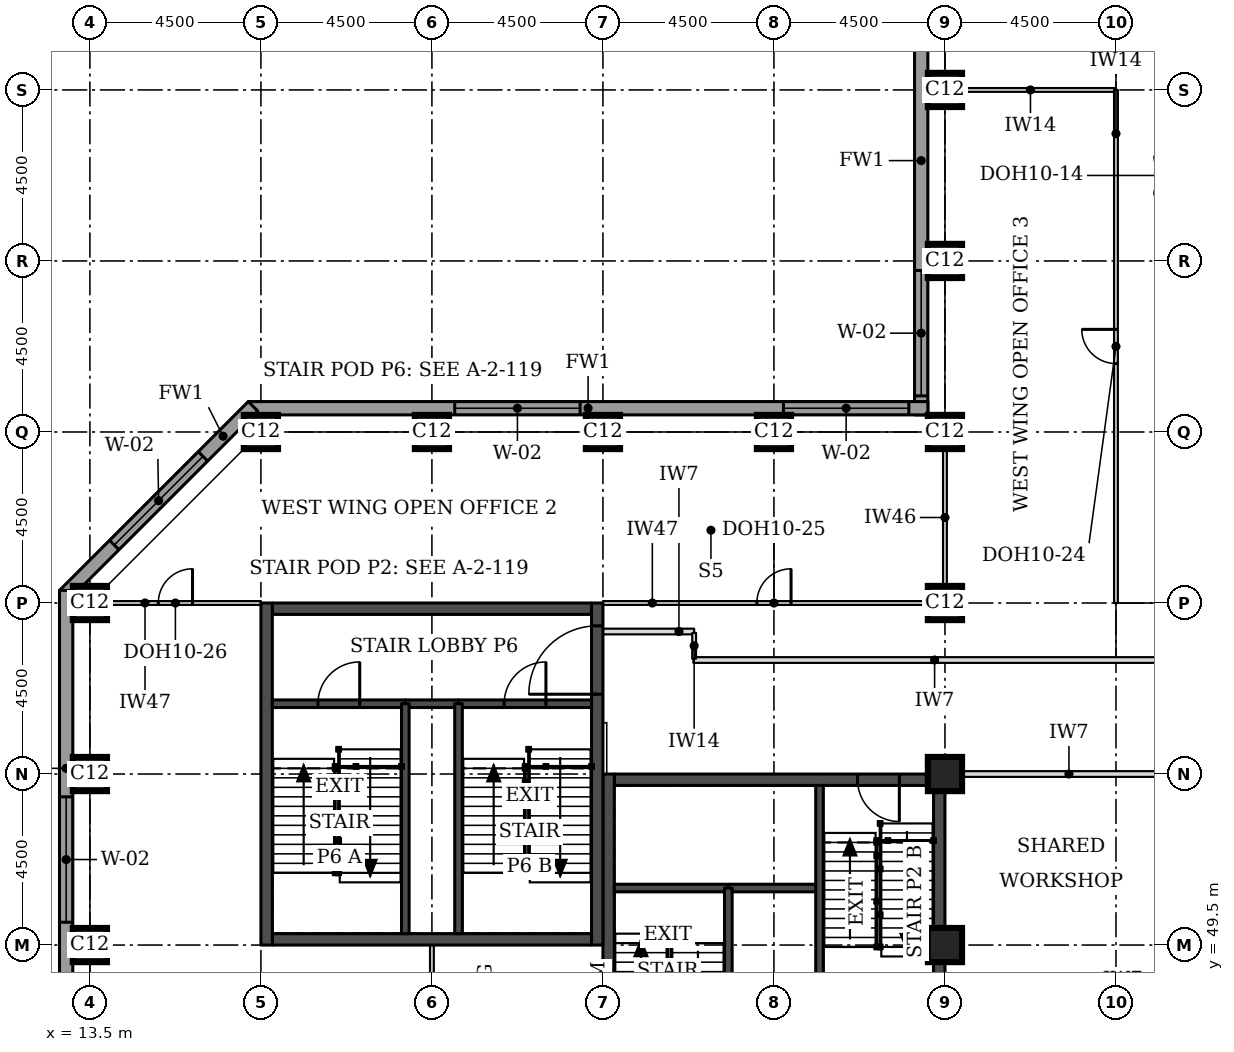
"""IFC4 building model, lengths in metres.
Left out: names, types, materials, properties, quantities, classifications, styles, units other than length and angle.
Written with IfcOpenShell. Run it as: python <this file> out.ifc"""

import sys

from ifc_helpers import new_model, si_unit, direction, frame, frame_2d, origin, origin_2d, place, context, subcontext, project, spatial, rectangle, extrude, element, fill, save


model = new_model("IFC4")
c1 = context("Model", 3, precision=1e-05, world=origin(), true_north=direction((0.0, 1.0)))
c2 = subcontext(c1, "Body", "Model", "MODEL_VIEW")
j1 = project(units=[si_unit("LENGTHUNIT", "METRE"), si_unit("PLANEANGLEUNIT", "RADIAN")], contexts=[c1])
p1 = place(None, origin())
s1 = spatial("IfcSite", under=j1, at=p1, CompositionType="ELEMENT")
p2 = place(p1, origin())
s2 = spatial("IfcBuilding", under=s1, at=p2, CompositionType="ELEMENT")
p3 = place(p2, frame((0.0, 0.0, 223.0)))
s3 = spatial("IfcBuildingStorey", under=s2, at=p3, CompositionType="ELEMENT", Elevation=223.0)
for number, where, z_axis, x_axis in (
    (1, (13.5, 49.5, 0.0), (0.0, 0.0, 1.0), (1.0, 0.0, 0.0)),
    (2, (36.0, 49.5, 0.0), (0.0, 0.0, 1.0), (1.0, 0.0, 0.0)),
    (3, (13.5, 54.0, 0.0), (0.0, 0.0, 1.0), (1.0, 0.0, 0.0)),
    (4, (36.0, 54.0, 0.0), (0.0, 0.0, 1.0), (1.0, 0.0, 0.0)),
    (5, (13.5, 58.5, 0.0), (0.0, 0.0, 1.0), (1.0, 0.0, 0.0)),
    (6, (36.0, 58.5, 0.0), (0.0, 0.0, 1.0), (1.0, 0.0, 0.0)),
    (7, (18.0, 63.0, 0.0), (0.0, 0.0, 1.0), (1.0, 0.0, 0.0)),
    (8, (22.5, 63.0, 0.0), (0.0, 0.0, 1.0), (1.0, 0.0, 0.0)),
    (9, (27.0, 63.0, 0.0), (0.0, 0.0, 1.0), (1.0, 0.0, 0.0)),
    (10, (31.5, 63.0, 0.0), (0.0, 0.0, 1.0), (1.0, 0.0, 0.0)),
    (11, (36.0, 63.0, 0.0), (0.0, 0.0, 1.0), (1.0, 0.0, 0.0)),
    (12, (36.0, 67.5, 0.0), (0.0, 0.0, 1.0), (1.0, 0.0, 0.0)),
    (13, (36.0, 72.0, 0.0), (0.0, 0.0, 1.0), (1.0, 0.0, 0.0)),
):
    element("IfcColumn", number, at=place(p3, frame(where, z_axis=z_axis, x_axis=x_axis)), inside=s3, PredefinedType="COLUMN", context=c2, shape_type="SweptSolid", body=[
        extrude(rectangle(XDim=0.9, YDim=0.9, at=origin_2d()), origin(), (0.0, 0.0, 1.0), 3.7),
    ])
p4 = place(p3, frame((27.3, 53.85, 0.0), z_axis=(0.0, 0.0, 1.0), x_axis=(1.0, 0.0, 0.0)))
e14 = element("IfcWall", 14, at=p4, inside=s3, PredefinedType="SHEAR", context=c2, shape_type="SweptSolid", body=[
    extrude(rectangle(XDim=8.4, YDim=0.3, at=frame_2d((4.2, 0.0))), origin(), (0.0, 0.0, 1.0), 3.7),
])
p5 = place(p4, frame((6.4, 0.0, 0.0)))
e15 = element("IfcOpeningElement", 15, at=p5, cuts=e14, PredefinedType="OPENING", context=c2, shape_type="SweptSolid", body=[
    extrude(rectangle(XDim=1.1, YDim=2.1, at=frame_2d((0.55, 1.05))), frame((0.0, 0.16, 0.0), z_axis=(0.0, -1.0, 0.0), x_axis=(1.0, 0.0, 0.0)), (0.0, 0.0, 1.0), 0.32),
])
p6 = place(p3, frame((27.15, 45.0, 0.0), z_axis=(0.0, 0.0, 1.0), x_axis=(0.0, 1.0, 0.0)))
e16 = element("IfcWall", 16, at=p6, inside=s3, PredefinedType="SHEAR", context=c2, shape_type="SweptSolid", body=[
    extrude(rectangle(XDim=9.0, YDim=0.3, at=frame_2d((4.5, 0.0))), origin(), (0.0, 0.0, 1.0), 3.7),
])
p7 = place(p6, frame((0.4, 0.0, 0.0)))
e17 = element("IfcOpeningElement", 17, at=p7, cuts=e16, PredefinedType="OPENING", context=c2, shape_type="SweptSolid", body=[
    extrude(rectangle(XDim=1.1, YDim=2.1, at=frame_2d((0.55, 1.05))), frame((0.0, 0.16, 0.0), z_axis=(0.0, -1.0, 0.0), x_axis=(1.0, 0.0, 0.0)), (0.0, 0.0, 1.0), 0.32),
])
p8 = place(p3, frame((35.85, 45.0, 0.0), z_axis=(0.0, 0.0, 1.0), x_axis=(0.0, 1.0, 0.0)))
e18 = element("IfcWall", 18, at=p8, inside=s3, PredefinedType="SHEAR", context=c2, shape_type="SweptSolid", body=[
    extrude(rectangle(XDim=9.0, YDim=0.3, at=frame_2d((4.5, 0.0))), origin(), (0.0, 0.0, 1.0), 3.7),
])
for number, where, z_axis, x_axis in (
    (19, (18.3, 49.65, 0.0), (0.0, 0.0, 1.0), (1.0, 0.0, 0.0)),
    (20, (18.3, 58.35, 0.0), (0.0, 0.0, 1.0), (1.0, 0.0, 0.0)),
):
    element("IfcWall", number, at=place(p3, frame(where, z_axis=z_axis, x_axis=x_axis)), inside=s3, PredefinedType="SHEAR", context=c2, shape_type="SweptSolid", body=[
        extrude(rectangle(XDim=8.4, YDim=0.3, at=frame_2d((4.2, 0.0))), origin(), (0.0, 0.0, 1.0), 3.7),
    ])
p9 = place(p3, frame((18.15, 49.5, 0.0), z_axis=(0.0, 0.0, 1.0), x_axis=(0.0, 1.0, 0.0)))
e21 = element("IfcWall", 21, at=p9, inside=s3, PredefinedType="SHEAR", context=c2, shape_type="SweptSolid", body=[
    extrude(rectangle(XDim=9.0, YDim=0.3, at=frame_2d((4.5, 0.0))), origin(), (0.0, 0.0, 1.0), 3.7),
])
p10 = place(p3, frame((26.85, 49.5, 0.0), z_axis=(0.0, 0.0, 1.0), x_axis=(0.0, 1.0, 0.0)))
e22 = element("IfcWall", 22, at=p10, inside=s3, PredefinedType="SHEAR", context=c2, shape_type="SweptSolid", body=[
    extrude(rectangle(XDim=9.0, YDim=0.3, at=frame_2d((4.5, 0.0))), origin(), (0.0, 0.0, 1.0), 3.7),
])
p11 = place(p10, frame((6.6, 0.0, 0.0)))
e23 = element("IfcOpeningElement", 23, at=p11, cuts=e22, PredefinedType="OPENING", context=c2, shape_type="SweptSolid", body=[
    extrude(rectangle(XDim=1.8, YDim=2.1, at=frame_2d((0.9, 1.05))), frame((0.0, 0.16, 0.0), z_axis=(0.0, -1.0, 0.0), x_axis=(1.0, 0.0, 0.0)), (0.0, 0.0, 1.0), 0.32),
])
p12 = place(p3, frame((35.375, 76.831, 0.0), z_axis=(0.0, 0.0, 1.0), x_axis=(0.0, -1.0, 0.0)))
e24 = element("IfcWall", 24, at=p12, inside=s3, PredefinedType="STANDARD", context=c2, shape_type="SweptSolid", body=[
    extrude(rectangle(XDim=13.381, YDim=0.35, at=frame_2d((6.691, 0.0))), origin(), (0.0, 0.0, 1.0), 3.525),
])
p13 = place(p12, frame((9.581, 0.0, 0.9)))
e25 = element("IfcOpeningElement", 25, at=p13, cuts=e24, PredefinedType="OPENING", context=c2, shape_type="SweptSolid", body=[
    extrude(rectangle(XDim=3.3, YDim=1.9, at=frame_2d((1.65, 0.95))), frame((0.0, 0.185, 0.0), z_axis=(0.0, -1.0, 0.0), x_axis=(1.0, 0.0, 0.0)), (0.0, 0.0, 1.0), 0.37),
])
p14 = place(p3, frame((35.55, 63.625, 0.0), z_axis=(0.0, 0.0, 1.0), x_axis=(-1.0, 0.0, 0.0)))
e26 = element("IfcWall", 26, at=p14, inside=s3, PredefinedType="STANDARD", context=c2, shape_type="SweptSolid", body=[
    extrude(rectangle(XDim=17.881, YDim=0.35, at=frame_2d((8.941, 0.0))), origin(), (0.0, 0.0, 1.0), 3.525),
])
p15 = place(p14, frame((0.5, 0.0, 0.9)))
e27 = element("IfcOpeningElement", 27, at=p15, cuts=e26, PredefinedType="OPENING", context=c2, shape_type="SweptSolid", body=[
    extrude(rectangle(XDim=3.3, YDim=1.9, at=frame_2d((1.65, 0.95))), frame((0.0, 0.185, 0.0), z_axis=(0.0, -1.0, 0.0), x_axis=(1.0, 0.0, 0.0)), (0.0, 0.0, 1.0), 0.37),
])
p16 = place(p14, frame((9.15, 0.0, 0.9)))
e28 = element("IfcOpeningElement", 28, at=p16, cuts=e26, PredefinedType="OPENING", context=c2, shape_type="SweptSolid", body=[
    extrude(rectangle(XDim=3.3, YDim=1.9, at=frame_2d((1.65, 0.95))), frame((0.0, 0.185, 0.0), z_axis=(0.0, -1.0, 0.0), x_axis=(1.0, 0.0, 0.0)), (0.0, 0.0, 1.0), 0.37),
])
p17 = place(p3, frame((17.792, 63.676, 0.0), z_axis=(0.0, 0.0, 1.0), x_axis=(-0.707106781187, -0.707106781187, 0.0)))
e29 = element("IfcWall", 29, at=p17, inside=s3, PredefinedType="STANDARD", context=c2, shape_type="SweptSolid", body=[
    extrude(rectangle(XDim=7.027, YDim=0.35, at=frame_2d((3.513, 0.0))), origin(), (0.0, 0.0, 1.0), 3.525),
])
p18 = place(p17, frame((1.863, 0.0, 0.9)))
e30 = element("IfcOpeningElement", 30, at=p18, cuts=e29, PredefinedType="OPENING", context=c2, shape_type="SweptSolid", body=[
    extrude(rectangle(XDim=3.3, YDim=1.9, at=frame_2d((1.65, 0.95))), frame((0.0, 0.185, 0.0), z_axis=(0.0, -1.0, 0.0), x_axis=(1.0, 0.0, 0.0)), (0.0, 0.0, 1.0), 0.37),
])
p19 = place(p3, frame((12.875, 58.831, 0.0), z_axis=(0.0, 0.0, 1.0), x_axis=(0.0, -1.0, 0.0)))
e31 = element("IfcWall", 31, at=p19, inside=s3, PredefinedType="STANDARD", context=c2, shape_type="SweptSolid", body=[
    extrude(rectangle(XDim=14.163, YDim=0.35, at=frame_2d((7.081, 0.0))), origin(), (0.0, 0.0, 1.0), 3.525),
])
p20 = place(p19, frame((5.431, 0.0, 0.9)))
e32 = element("IfcOpeningElement", 32, at=p20, cuts=e31, PredefinedType="OPENING", context=c2, shape_type="SweptSolid", body=[
    extrude(rectangle(XDim=3.3, YDim=1.9, at=frame_2d((1.65, 0.95))), frame((0.0, 0.185, 0.0), z_axis=(0.0, -1.0, 0.0), x_axis=(1.0, 0.0, 0.0)), (0.0, 0.0, 1.0), 0.37),
])
p21 = place(p3, frame((36.45, 54.0, 0.0), z_axis=(0.0, 0.0, 1.0), x_axis=(1.0, 0.0, 0.0)))
e33 = element("IfcWall", 33, at=p21, inside=s3, PredefinedType="PARTITIONING", context=c2, shape_type="SweptSolid", body=[
    extrude(rectangle(XDim=5.625, YDim=0.15, at=frame_2d((2.812, 0.0))), origin(), (0.0, 0.0, 1.0), 3.55),
])
p22 = place(p3, frame((29.38, 57.0, 0.0), z_axis=(0.0, 0.0, 1.0), x_axis=(1.0, 0.0, 0.0)))
e34 = element("IfcWall", 34, at=p22, inside=s3, PredefinedType="PARTITIONING", context=c2, shape_type="SweptSolid", body=[
    extrude(rectangle(XDim=12.695, YDim=0.15, at=frame_2d((6.348, 0.0))), origin(), (0.0, 0.0, 1.0), 3.55),
])
p23 = place(p3, frame((36.0, 72.0, 0.0), z_axis=(0.0, 0.0, 1.0), x_axis=(1.0, 0.0, 0.0)))
e35 = element("IfcWall", 35, at=p23, inside=s3, PredefinedType="PARTITIONING", context=c2, shape_type="SweptSolid", body=[
    extrude(rectangle(XDim=4.5, YDim=0.1, at=frame_2d((2.25, 0.0))), origin(), (0.0, 0.0, 1.0), 3.55),
])
p24 = place(p3, frame((40.5, 72.0, 0.0), z_axis=(0.0, 0.0, 1.0), x_axis=(0.0, -1.0, 0.0)))
e36 = element("IfcWall", 36, at=p24, inside=s3, PredefinedType="PARTITIONING", context=c2, shape_type="SweptSolid", body=[
    extrude(rectangle(XDim=13.5, YDim=0.1, at=frame_2d((6.75, 0.0))), origin(), (0.0, 0.0, 1.0), 3.55),
])
p25 = place(p24, frame((6.3, 0.0, 0.0)))
e37 = element("IfcOpeningElement", 37, at=p25, cuts=e36, PredefinedType="OPENING", context=c2, shape_type="SweptSolid", body=[
    extrude(rectangle(XDim=0.9, YDim=2.1, at=frame_2d((0.45, 1.05))), frame((0.0, 0.06, 0.0), z_axis=(0.0, -1.0, 0.0), x_axis=(1.0, 0.0, 0.0)), (0.0, 0.0, 1.0), 0.12),
])
p26 = place(p3, frame((36.0, 63.0, 0.0), z_axis=(0.0, 0.0, 1.0), x_axis=(0.0, -1.0, 0.0)))
e38 = element("IfcWall", 38, at=p26, inside=s3, PredefinedType="PARTITIONING", context=c2, shape_type="SweptSolid", body=[
    extrude(rectangle(XDim=4.5, YDim=0.1, at=frame_2d((2.25, 0.0))), origin(), (0.0, 0.0, 1.0), 2.8),
])
p27 = place(p3, frame((36.0, 58.5, 0.0), z_axis=(0.0, 0.0, 1.0), x_axis=(-1.0, 0.0, 0.0)))
e39 = element("IfcWall", 39, at=p27, inside=s3, PredefinedType="PARTITIONING", context=c2, shape_type="SweptSolid", body=[
    extrude(rectangle(XDim=9.0, YDim=0.1, at=frame_2d((4.5, 0.0))), origin(), (0.0, 0.0, 1.0), 2.55),
])
p28 = place(p27, frame((4.05, 0.0, 0.0)))
e40 = element("IfcOpeningElement", 40, at=p28, cuts=e39, PredefinedType="OPENING", context=c2, shape_type="SweptSolid", body=[
    extrude(rectangle(XDim=0.9, YDim=2.1, at=frame_2d((0.45, 1.05))), frame((0.0, 0.06, 0.0), z_axis=(0.0, -1.0, 0.0), x_axis=(1.0, 0.0, 0.0)), (0.0, 0.0, 1.0), 0.12),
])
p29 = place(p3, frame((13.5, 58.5, 0.0), z_axis=(0.0, 0.0, 1.0), x_axis=(1.0, 0.0, 0.0)))
e41 = element("IfcWall", 41, at=p29, inside=s3, PredefinedType="PARTITIONING", context=c2, shape_type="SweptSolid", body=[
    extrude(rectangle(XDim=4.5, YDim=0.1, at=frame_2d((2.25, 0.0))), origin(), (0.0, 0.0, 1.0), 2.55),
])
p30 = place(p29, frame((1.8, 0.0, 0.0)))
e42 = element("IfcOpeningElement", 42, at=p30, cuts=e41, PredefinedType="OPENING", context=c2, shape_type="SweptSolid", body=[
    extrude(rectangle(XDim=0.9, YDim=2.1, at=frame_2d((0.45, 1.05))), frame((0.0, 0.06, 0.0), z_axis=(0.0, -1.0, 0.0), x_axis=(1.0, 0.0, 0.0)), (0.0, 0.0, 1.0), 0.12),
])
p31 = place(p3, frame((22.5, 49.5, 0.0), z_axis=(0.0, 0.0, 1.0), x_axis=(0.0, -1.0, 0.0)))
e43 = element("IfcWall", 43, at=p31, inside=s3, PredefinedType="PARTITIONING", context=c2, shape_type="SweptSolid", body=[
    extrude(rectangle(XDim=4.5, YDim=0.1, at=frame_2d((2.25, 0.0))), origin(), (0.0, 0.0, 1.0), 3.55),
])
p32 = place(p31, frame((1.8, 0.0, 0.0)))
e44 = element("IfcOpeningElement", 44, at=p32, cuts=e43, PredefinedType="OPENING", context=c2, shape_type="SweptSolid", body=[
    extrude(rectangle(XDim=0.9, YDim=2.1, at=frame_2d((0.45, 1.05))), frame((0.0, 0.06, 0.0), z_axis=(0.0, -1.0, 0.0), x_axis=(1.0, 0.0, 0.0)), (0.0, 0.0, 1.0), 0.12),
])
p33 = place(p3, frame((27.0, 57.75, 0.0), z_axis=(0.0, 0.0, 1.0), x_axis=(1.0, 0.0, 0.0)))
e45 = element("IfcWall", 45, at=p33, inside=s3, PredefinedType="PARTITIONING", context=c2, shape_type="SweptSolid", body=[
    extrude(rectangle(XDim=2.4, YDim=0.15, at=frame_2d((1.2, 0.0))), origin(), (0.0, 0.0, 1.0), 3.55),
])
p34 = place(p3, frame((29.4, 57.715, 0.0), z_axis=(0.0, 0.0, 1.0), x_axis=(0.0, -1.0, 0.0)))
e46 = element("IfcWall", 46, at=p34, inside=s3, PredefinedType="PARTITIONING", context=c2, shape_type="SweptSolid", body=[
    extrude(rectangle(XDim=0.68, YDim=0.1, at=frame_2d((0.34, 0.0))), origin(), (0.0, 0.0, 1.0), 3.55),
])
p35 = place(p3, frame((30.3, 51.0, 0.0), z_axis=(0.0, 0.0, 1.0), x_axis=(1.0, 0.0, 0.0)))
e47 = element("IfcWall", 47, at=p35, inside=s3, PredefinedType="SOLIDWALL", context=c2, shape_type="SweptSolid", body=[
    extrude(rectangle(XDim=2.4, YDim=0.2, at=frame_2d((1.2, 0.0))), origin(), (0.0, 0.0, 1.0), 3.7),
])
p36 = place(p3, frame((27.3, 51.0, 0.0), z_axis=(0.0, 0.0, 1.0), x_axis=(1.0, 0.0, 0.0)))
e48 = element("IfcWall", 48, at=p36, inside=s3, PredefinedType="SOLIDWALL", context=c2, shape_type="SweptSolid", body=[
    extrude(rectangle(XDim=3.0, YDim=0.2, at=frame_2d((1.5, 0.0))), origin(), (0.0, 0.0, 1.0), 3.55),
])
for number, where, z_axis, x_axis in (
    (49, (30.3, 45.3, 0.0), (0.0, 0.0, 1.0), (0.0, 1.0, 0.0)),
    (50, (32.7, 48.0, 0.0), (0.0, 0.0, 1.0), (0.0, 1.0, 0.0)),
):
    element("IfcWall", number, at=place(p3, frame(where, z_axis=z_axis, x_axis=x_axis)), inside=s3, PredefinedType="SOLIDWALL", context=c2, shape_type="SweptSolid", body=[
        extrude(rectangle(XDim=5.7, YDim=0.2, at=frame_2d((2.85, 0.0))), origin(), (0.0, 0.0, 1.0), 3.55),
    ])
p37 = place(p3, frame((21.8, 55.85, 0.0), z_axis=(0.0, 0.0, 1.0), x_axis=(1.0, 0.0, 0.0)))
e51 = element("IfcWall", 51, at=p37, inside=s3, PredefinedType="SOLIDWALL", context=c2, shape_type="SweptSolid", body=[
    extrude(rectangle(XDim=1.4, YDim=0.2, at=frame_2d((0.7, 0.0))), origin(), (0.0, 0.0, 1.0), 3.55),
])
p38 = place(p3, frame((18.3, 55.85, 0.0), z_axis=(0.0, 0.0, 1.0), x_axis=(1.0, 0.0, 0.0)))
e52 = element("IfcWall", 52, at=p38, inside=s3, PredefinedType="SOLIDWALL", context=c2, shape_type="SweptSolid", body=[
    extrude(rectangle(XDim=3.5, YDim=0.2, at=frame_2d((1.75, 0.0))), origin(), (0.0, 0.0, 1.0), 3.55),
])
p39 = place(p38, frame((1.2, 0.0, 0.0)))
e53 = element("IfcOpeningElement", 53, at=p39, cuts=e52, PredefinedType="OPENING", context=c2, shape_type="SweptSolid", body=[
    extrude(rectangle(XDim=1.1, YDim=2.1, at=frame_2d((0.55, 1.05))), frame((0.0, 0.11, 0.0), z_axis=(0.0, -1.0, 0.0), x_axis=(1.0, 0.0, 0.0)), (0.0, 0.0, 1.0), 0.22),
])
p40 = place(p3, frame((23.2, 55.85, 0.0), z_axis=(0.0, 0.0, 1.0), x_axis=(1.0, 0.0, 0.0)))
e54 = element("IfcWall", 54, at=p40, inside=s3, PredefinedType="SOLIDWALL", context=c2, shape_type="SweptSolid", body=[
    extrude(rectangle(XDim=3.5, YDim=0.2, at=frame_2d((1.75, 0.0))), origin(), (0.0, 0.0, 1.0), 3.55),
])
p41 = place(p40, frame((1.2, 0.0, 0.0)))
e55 = element("IfcOpeningElement", 55, at=p41, cuts=e54, PredefinedType="OPENING", context=c2, shape_type="SweptSolid", body=[
    extrude(rectangle(XDim=1.1, YDim=2.1, at=frame_2d((0.55, 1.05))), frame((0.0, 0.11, 0.0), z_axis=(0.0, -1.0, 0.0), x_axis=(1.0, 0.0, 0.0)), (0.0, 0.0, 1.0), 0.22),
])
for number, where, z_axis, x_axis in (
    (56, (21.8, 49.8, 0.0), (0.0, 0.0, 1.0), (0.0, 1.0, 0.0)),
    (57, (23.2, 49.8, 0.0), (0.0, 0.0, 1.0), (0.0, 1.0, 0.0)),
):
    element("IfcWall", number, at=place(p3, frame(where, z_axis=z_axis, x_axis=x_axis)), inside=s3, PredefinedType="SOLIDWALL", context=c2, shape_type="SweptSolid", body=[
        extrude(rectangle(XDim=6.05, YDim=0.2, at=frame_2d((3.025, 0.0))), origin(), (0.0, 0.0, 1.0), 3.55),
    ])
p42 = place(p13, origin())
e58 = element("IfcWindow", 58, at=p42, inside=s3, PartitioningType="SINGLE_PANEL", PredefinedType="WINDOW", context=c2, shape_type="SweptSolid", body=[
    extrude(rectangle(XDim=3.3, YDim=1.9, at=frame_2d((1.65, 0.95))), frame((0.0, 0.085, 0.0), z_axis=(0.0, -1.0, 0.0), x_axis=(1.0, 0.0, 0.0)), (0.0, 0.0, 1.0), 0.06),
])
fill(e25, e58)
p43 = place(p15, origin())
e59 = element("IfcWindow", 59, at=p43, inside=s3, PartitioningType="SINGLE_PANEL", PredefinedType="WINDOW", context=c2, shape_type="SweptSolid", body=[
    extrude(rectangle(XDim=3.3, YDim=1.9, at=frame_2d((1.65, 0.95))), frame((0.0, 0.085, 0.0), z_axis=(0.0, -1.0, 0.0), x_axis=(1.0, 0.0, 0.0)), (0.0, 0.0, 1.0), 0.06),
])
fill(e27, e59)
p44 = place(p16, origin())
e60 = element("IfcWindow", 60, at=p44, inside=s3, PartitioningType="SINGLE_PANEL", PredefinedType="WINDOW", context=c2, shape_type="SweptSolid", body=[
    extrude(rectangle(XDim=3.3, YDim=1.9, at=frame_2d((1.65, 0.95))), frame((0.0, 0.085, 0.0), z_axis=(0.0, -1.0, 0.0), x_axis=(1.0, 0.0, 0.0)), (0.0, 0.0, 1.0), 0.06),
])
fill(e28, e60)
p45 = place(p18, origin())
e61 = element("IfcWindow", 61, at=p45, inside=s3, PartitioningType="SINGLE_PANEL", PredefinedType="WINDOW", context=c2, shape_type="SweptSolid", body=[
    extrude(rectangle(XDim=3.3, YDim=1.9, at=frame_2d((1.65, 0.95))), frame((0.0, 0.085, 0.0), z_axis=(0.0, -1.0, 0.0), x_axis=(1.0, 0.0, 0.0)), (0.0, 0.0, 1.0), 0.06),
])
fill(e30, e61)
p46 = place(p20, origin())
e62 = element("IfcWindow", 62, at=p46, inside=s3, PartitioningType="SINGLE_PANEL", PredefinedType="WINDOW", context=c2, shape_type="SweptSolid", body=[
    extrude(rectangle(XDim=3.3, YDim=1.9, at=frame_2d((1.65, 0.95))), frame((0.0, 0.085, 0.0), z_axis=(0.0, -1.0, 0.0), x_axis=(1.0, 0.0, 0.0)), (0.0, 0.0, 1.0), 0.06),
])
fill(e32, e62)
p47 = place(p25, frame((0.9, 0.0, 0.0), z_axis=(0.0, 0.0, 1.0), x_axis=(-1.0, 0.0, 0.0)))
e63 = element("IfcDoor", 63, at=p47, inside=s3, OperationType="SINGLE_SWING_RIGHT", PredefinedType="DOOR", context=c2, shape_type="SweptSolid", body=[
    extrude(rectangle(XDim=0.9, YDim=2.1, at=frame_2d((0.45, 1.05))), frame((0.0, 0.025, 0.0), z_axis=(0.0, -1.0, 0.0), x_axis=(1.0, 0.0, 0.0)), (0.0, 0.0, 1.0), 0.05),
])
fill(e37, e63)
p48 = place(p28, frame((0.9, 0.0, 0.0), z_axis=(0.0, 0.0, 1.0), x_axis=(-1.0, 0.0, 0.0)))
e64 = element("IfcDoor", 64, at=p48, inside=s3, OperationType="SINGLE_SWING_RIGHT", PredefinedType="DOOR", context=c2, shape_type="SweptSolid", body=[
    extrude(rectangle(XDim=0.9, YDim=2.1, at=frame_2d((0.45, 1.05))), frame((0.0, 0.025, 0.0), z_axis=(0.0, -1.0, 0.0), x_axis=(1.0, 0.0, 0.0)), (0.0, 0.0, 1.0), 0.05),
])
fill(e40, e64)
p49 = place(p30, origin())
e65 = element("IfcDoor", 65, at=p49, inside=s3, OperationType="SINGLE_SWING_RIGHT", PredefinedType="DOOR", context=c2, shape_type="SweptSolid", body=[
    extrude(rectangle(XDim=0.9, YDim=2.1, at=frame_2d((0.45, 1.05))), frame((0.0, 0.025, 0.0), z_axis=(0.0, -1.0, 0.0), x_axis=(1.0, 0.0, 0.0)), (0.0, 0.0, 1.0), 0.05),
])
fill(e42, e65)
p50 = place(p5, frame((1.1, 0.0, 0.0), z_axis=(0.0, 0.0, 1.0), x_axis=(-1.0, 0.0, 0.0)))
e66 = element("IfcDoor", 66, at=p50, inside=s3, OperationType="SINGLE_SWING_LEFT", PredefinedType="DOOR", context=c2, shape_type="SweptSolid", body=[
    extrude(rectangle(XDim=1.1, YDim=2.1, at=frame_2d((0.55, 1.05))), frame((0.0, 0.025, 0.0), z_axis=(0.0, -1.0, 0.0), x_axis=(1.0, 0.0, 0.0)), (0.0, 0.0, 1.0), 0.05),
])
fill(e15, e66)
p51 = place(p39, origin())
e67 = element("IfcDoor", 67, at=p51, inside=s3, OperationType="SINGLE_SWING_RIGHT", PredefinedType="DOOR", context=c2, shape_type="SweptSolid", body=[
    extrude(rectangle(XDim=1.1, YDim=2.1, at=frame_2d((0.55, 1.05))), frame((0.0, 0.025, 0.0), z_axis=(0.0, -1.0, 0.0), x_axis=(1.0, 0.0, 0.0)), (0.0, 0.0, 1.0), 0.05),
])
fill(e53, e67)
p52 = place(p41, origin())
e68 = element("IfcDoor", 68, at=p52, inside=s3, OperationType="SINGLE_SWING_RIGHT", PredefinedType="DOOR", context=c2, shape_type="SweptSolid", body=[
    extrude(rectangle(XDim=1.1, YDim=2.1, at=frame_2d((0.55, 1.05))), frame((0.0, 0.025, 0.0), z_axis=(0.0, -1.0, 0.0), x_axis=(1.0, 0.0, 0.0)), (0.0, 0.0, 1.0), 0.05),
])
fill(e55, e68)
p53 = place(p11, origin())
e69 = element("IfcDoor", 69, at=p53, inside=s3, OperationType="SINGLE_SWING_LEFT", PredefinedType="DOOR", context=c2, shape_type="SweptSolid", body=[
    extrude(rectangle(XDim=1.8, YDim=2.1, at=frame_2d((0.9, 1.05))), frame((0.0, 0.025, 0.0), z_axis=(0.0, -1.0, 0.0), x_axis=(1.0, 0.0, 0.0)), (0.0, 0.0, 1.0), 0.05),
])
fill(e23, e69)
save(model, sys.argv[1])
